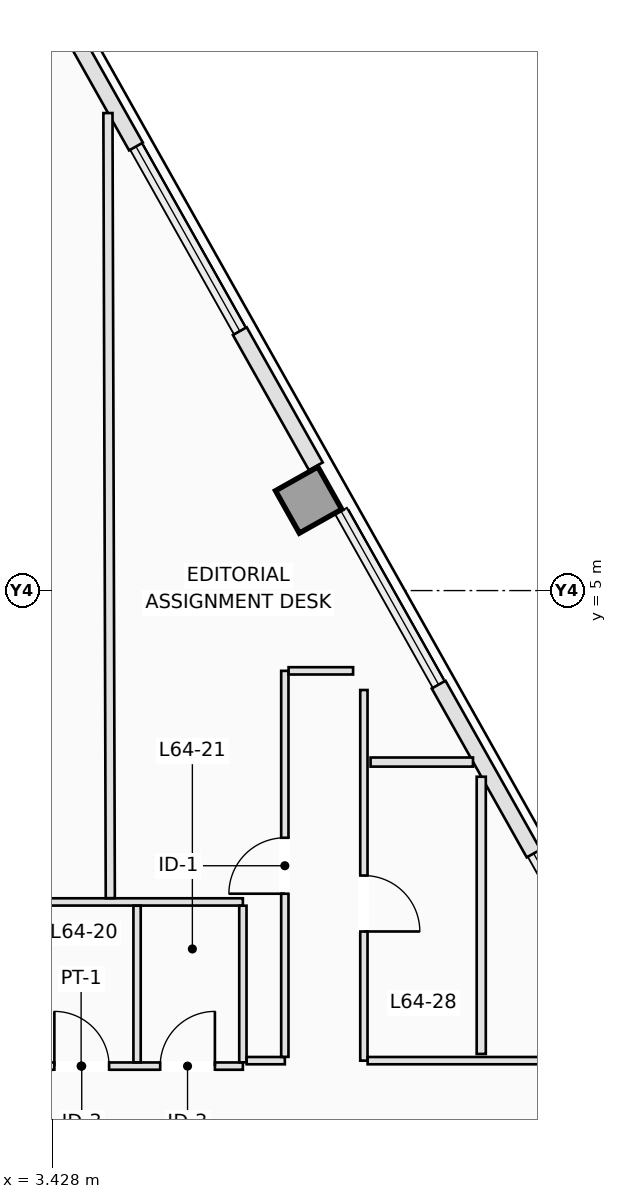
"""IFC4 building model, lengths in metres.
Left out: names, types, materials, properties, quantities, classifications, styles, units other than length and angle.
Written with IfcOpenShell. Run it as: python <this file> out.ifc"""

import sys

from ifc_helpers import new_model, si_unit, direction, frame, frame_2d, origin, origin_2d, place, context, subcontext, project, spatial, rectangle, extrude, element, fill, save


model = new_model("IFC4")
c1 = context("Model", 3, precision=1e-05, world=origin(), true_north=direction((0.0, 1.0)))
c2 = subcontext(c1, "Body", "Model", "MODEL_VIEW")
j1 = project(units=[si_unit("LENGTHUNIT", "METRE"), si_unit("PLANEANGLEUNIT", "RADIAN")], contexts=[c1])
p1 = place(None, origin())
s1 = spatial("IfcSite", under=j1, at=p1, CompositionType="ELEMENT")
p2 = place(p1, origin())
s2 = spatial("IfcBuilding", under=s1, at=p2, CompositionType="ELEMENT")
p3 = place(p2, frame((0.0, 0.0, 232.4)))
s3 = spatial("IfcBuildingStorey", under=s2, at=p3, CompositionType="ELEMENT", Elevation=232.4)
p4 = place(p3, frame((7.642, 6.489, 0.0), z_axis=(0.0, 0.0, 1.0), x_axis=(0.871575139605, 0.490261946333, 0.0)))
e1 = element("IfcColumn", 1, at=p4, inside=s3, PredefinedType="COLUMN", context=c2, shape_type="SweptSolid", body=[
    extrude(rectangle(XDim=0.8, YDim=0.8, at=origin_2d()), origin(), (0.0, 0.0, 1.0), 3.5),
])
p5 = place(p3, frame((2.82, 15.826, 0.0), z_axis=(0.0, 0.0, 1.0), x_axis=(0.490307113915, -0.871549731251, 0.0)))
e2 = element("IfcWall", 2, at=p5, inside=s3, PredefinedType="STANDARD", context=c2, shape_type="SweptSolid", body=[
    extrude(rectangle(XDim=4.043, YDim=0.26, at=frame_2d((2.021, 0.0))), origin(), (0.0, 0.0, 1.0), 3.25),
])
p6 = place(p3, frame((6.51, 9.266, 0.0), z_axis=(0.0, 0.0, 1.0), x_axis=(0.490333959365, -0.871534628281, 0.0)))
e3 = element("IfcWall", 3, at=p6, inside=s3, PredefinedType="STANDARD", context=c2, shape_type="SweptSolid", body=[
    extrude(rectangle(XDim=2.55, YDim=0.26, at=frame_2d((1.275, 0.0))), origin(), (0.0, 0.0, 1.0), 3.25),
])
p7 = place(p3, frame((9.779, 3.454, 0.0), z_axis=(0.0, 0.0, 1.0), x_axis=(0.490268515903, -0.871571444182, 0.0)))
e4 = element("IfcWall", 4, at=p7, inside=s3, PredefinedType="STANDARD", context=c2, shape_type="SweptSolid", body=[
    extrude(rectangle(XDim=3.186, YDim=0.26, at=frame_2d((1.593, 0.0))), origin(), (0.0, 0.0, 1.0), 3.25),
])
p8 = place(p3, frame((1.24, -2.82, 0.0), z_axis=(0.0, 0.0, 1.0), x_axis=(1.0, 0.0, 0.0)))
e5 = element("IfcWall", 5, at=p8, inside=s3, PredefinedType="PARTITIONING", context=c2, shape_type="SweptSolid", body=[
    extrude(rectangle(XDim=5.32, YDim=0.12, at=frame_2d((2.66, 0.0))), origin(), (0.0, 0.0, 1.0), 2.943),
])
p9 = place(p8, frame((0.42, 0.0, 0.0)))
e6 = element("IfcOpeningElement", 6, at=p9, cuts=e5, PredefinedType="OPENING", context=c2, shape_type="SweptSolid", body=[
    extrude(rectangle(XDim=0.9, YDim=2.12, at=frame_2d((0.45, 1.06))), frame((0.0, 0.07, 0.0), z_axis=(0.0, -1.0, 0.0), x_axis=(1.0, 0.0, 0.0)), (0.0, 0.0, 1.0), 0.14),
])
p10 = place(p8, frame((2.22, 0.0, 0.0)))
e7 = element("IfcOpeningElement", 7, at=p10, cuts=e5, PredefinedType="OPENING", context=c2, shape_type="SweptSolid", body=[
    extrude(rectangle(XDim=0.9, YDim=2.12, at=frame_2d((0.45, 1.06))), frame((0.0, 0.07, 0.0), z_axis=(0.0, -1.0, 0.0), x_axis=(1.0, 0.0, 0.0)), (0.0, 0.0, 1.0), 0.14),
])
p11 = place(p8, frame((3.96, 0.0, 0.0)))
e8 = element("IfcOpeningElement", 8, at=p11, cuts=e5, PredefinedType="OPENING", context=c2, shape_type="SweptSolid", body=[
    extrude(rectangle(XDim=0.9, YDim=2.12, at=frame_2d((0.45, 1.06))), frame((0.0, 0.07, 0.0), z_axis=(0.0, -1.0, 0.0), x_axis=(1.0, 0.0, 0.0)), (0.0, 0.0, 1.0), 0.14),
])
p12 = place(p3, frame((1.24, -0.12, 0.0), z_axis=(0.0, 0.0, 1.0), x_axis=(1.0, 0.0, 0.0)))
e9 = element("IfcWall", 9, at=p12, inside=s3, PredefinedType="PARTITIONING", context=c2, shape_type="SweptSolid", body=[
    extrude(rectangle(XDim=5.32, YDim=0.12, at=frame_2d((2.66, 0.0))), origin(), (0.0, 0.0, 1.0), 3.25),
])
for number, where, z_axis, x_axis in (
    (10, (4.82, -2.758, 0.0), (0.0, 0.0, 1.0), (0.0, 1.0, 0.0)),
    (11, (6.56, -2.758, 0.0), (0.0, 0.0, 1.0), (0.0, 1.0, 0.0)),
):
    element("IfcWall", number, at=place(p3, frame(where, z_axis=z_axis, x_axis=x_axis)), inside=s3, PredefinedType="PARTITIONING", context=c2, shape_type="SweptSolid", body=[
        extrude(rectangle(XDim=2.576, YDim=0.12, at=frame_2d((1.288, 0.0))), origin(), (0.0, 0.0, 1.0), 3.25),
    ])
p13 = place(p3, frame((6.622, -2.73, 0.0), z_axis=(0.0, 0.0, 1.0), x_axis=(1.0, 0.0, 0.0)))
e12 = element("IfcWall", 12, at=p13, inside=s3, PredefinedType="PARTITIONING", context=c2, shape_type="SweptSolid", body=[
    extrude(rectangle(XDim=0.628, YDim=0.12, at=frame_2d((0.314, 0.0))), origin(), (0.0, 0.0, 1.0), 3.25),
])
p14 = place(p3, frame((7.25, -2.668, 0.0), z_axis=(0.0, 0.0, 1.0), x_axis=(0.0, 1.0, 0.0)))
e13 = element("IfcWall", 13, at=p14, inside=s3, PredefinedType="PARTITIONING", context=c2, shape_type="SweptSolid", body=[
    extrude(rectangle(XDim=6.348, YDim=0.12, at=frame_2d((3.174, 0.0))), origin(), (0.0, 0.0, 1.0), 3.25),
])
p15 = place(p14, frame((2.683, 0.0, 0.0)))
e14 = element("IfcOpeningElement", 14, at=p15, cuts=e13, PredefinedType="OPENING", context=c2, shape_type="SweptSolid", body=[
    extrude(rectangle(XDim=0.92, YDim=2.12, at=frame_2d((0.46, 1.06))), frame((0.0, 0.07, 0.0), z_axis=(0.0, -1.0, 0.0), x_axis=(1.0, 0.0, 0.0)), (0.0, 0.0, 1.0), 0.14),
])
p16 = place(p3, frame((7.312, 3.68, 0.0), z_axis=(0.0, 0.0, 1.0), x_axis=(1.0, 0.0, 0.0)))
e15 = element("IfcWall", 15, at=p16, inside=s3, PredefinedType="PARTITIONING", context=c2, shape_type="SweptSolid", body=[
    extrude(rectangle(XDim=1.061, YDim=0.12, at=frame_2d((0.53, 0.0))), origin(), (0.0, 0.0, 1.0), 3.25),
])
p17 = place(p3, frame((8.55, 3.365, 0.0), z_axis=(0.0, 0.0, 1.0), x_axis=(0.0, -1.0, 0.0)))
e16 = element("IfcWall", 16, at=p17, inside=s3, PredefinedType="PARTITIONING", context=c2, shape_type="SweptSolid", body=[
    extrude(rectangle(XDim=6.095, YDim=0.12, at=frame_2d((3.047, 0.0))), origin(), (0.0, 0.0, 1.0), 3.25),
])
p18 = place(p17, frame((3.051, 0.0, 0.0)))
e17 = element("IfcOpeningElement", 17, at=p18, cuts=e16, PredefinedType="OPENING", context=c2, shape_type="SweptSolid", body=[
    extrude(rectangle(XDim=0.92, YDim=2.12, at=frame_2d((0.46, 1.06))), frame((0.0, 0.07, 0.0), z_axis=(0.0, -1.0, 0.0), x_axis=(1.0, 0.0, 0.0)), (0.0, 0.0, 1.0), 0.14),
])
p19 = place(p3, frame((8.612, -2.73, 0.0), z_axis=(0.0, 0.0, 1.0), x_axis=(1.0, 0.0, 0.0)))
e18 = element("IfcWall", 18, at=p19, inside=s3, PredefinedType="PARTITIONING", context=c2, shape_type="SweptSolid", body=[
    extrude(rectangle(XDim=3.288, YDim=0.12, at=frame_2d((1.644, 0.0))), origin(), (0.0, 0.0, 1.0), 3.25),
])
p20 = place(p3, frame((4.341, 12.853, 0.0), z_axis=(0.0, 0.0, 1.0), x_axis=(0.003025533114, -0.999995423064, 0.0)))
e19 = element("IfcWall", 19, at=p20, inside=s3, PredefinedType="PARTITIONING", context=c2, shape_type="SweptSolid", body=[
    extrude(rectangle(XDim=12.911, YDim=0.15, at=frame_2d((6.456, 0.0))), origin(), (0.0, 0.0, 1.0), 3.25),
])
p21 = place(p3, frame((10.344, 2.18, 0.0), z_axis=(0.0, 0.0, 1.0), x_axis=(-1.0, 0.0, 0.0)))
e20 = element("IfcWall", 20, at=p21, inside=s3, PredefinedType="PARTITIONING", context=c2, shape_type="SweptSolid", body=[
    extrude(rectangle(XDim=1.684, YDim=0.15, at=frame_2d((0.842, 0.0))), origin(), (0.0, 0.0, 1.0), 3.25),
])
p22 = place(p3, frame((10.48, 1.939, 0.0), z_axis=(0.0, 0.0, 1.0), x_axis=(0.0, -1.0, 0.0)))
e21 = element("IfcWall", 21, at=p22, inside=s3, PredefinedType="PARTITIONING", context=c2, shape_type="SweptSolid", body=[
    extrude(rectangle(XDim=4.559, YDim=0.15, at=frame_2d((2.279, 0.0))), origin(), (0.0, 0.0, 1.0), 3.25),
])
p23 = place(p10, origin())
e22 = element("IfcDoor", 22, at=p23, inside=s3, OperationType="SINGLE_SWING_LEFT", PredefinedType="DOOR", context=c2, shape_type="SweptSolid", body=[
    extrude(rectangle(XDim=0.9, YDim=2.12, at=frame_2d((0.45, 1.06))), frame((0.0, 0.025, 0.0), z_axis=(0.0, -1.0, 0.0), x_axis=(1.0, 0.0, 0.0)), (0.0, 0.0, 1.0), 0.05),
])
fill(e7, e22)
p24 = place(p11, origin())
e23 = element("IfcDoor", 23, at=p24, inside=s3, OperationType="SINGLE_SWING_RIGHT", PredefinedType="DOOR", context=c2, shape_type="SweptSolid", body=[
    extrude(rectangle(XDim=0.9, YDim=2.12, at=frame_2d((0.45, 1.06))), frame((0.0, 0.025, 0.0), z_axis=(0.0, -1.0, 0.0), x_axis=(1.0, 0.0, 0.0)), (0.0, 0.0, 1.0), 0.05),
])
fill(e8, e23)
p25 = place(p15, origin())
e24 = element("IfcDoor", 24, at=p25, inside=s3, OperationType="SINGLE_SWING_LEFT", PredefinedType="DOOR", context=c2, shape_type="SweptSolid", body=[
    extrude(rectangle(XDim=0.92, YDim=2.12, at=frame_2d((0.46, 1.06))), frame((0.0, 0.025, 0.0), z_axis=(0.0, -1.0, 0.0), x_axis=(1.0, 0.0, 0.0)), (0.0, 0.0, 1.0), 0.05),
])
fill(e14, e24)
p26 = place(p18, origin())
e25 = element("IfcDoor", 25, at=p26, inside=s3, OperationType="SINGLE_SWING_RIGHT", PredefinedType="DOOR", context=c2, shape_type="SweptSolid", body=[
    extrude(rectangle(XDim=0.92, YDim=2.12, at=frame_2d((0.46, 1.06))), frame((0.0, 0.025, 0.0), z_axis=(0.0, -1.0, 0.0), x_axis=(1.0, 0.0, 0.0)), (0.0, 0.0, 1.0), 0.05),
])
fill(e17, e25)
save(model, sys.argv[1])
